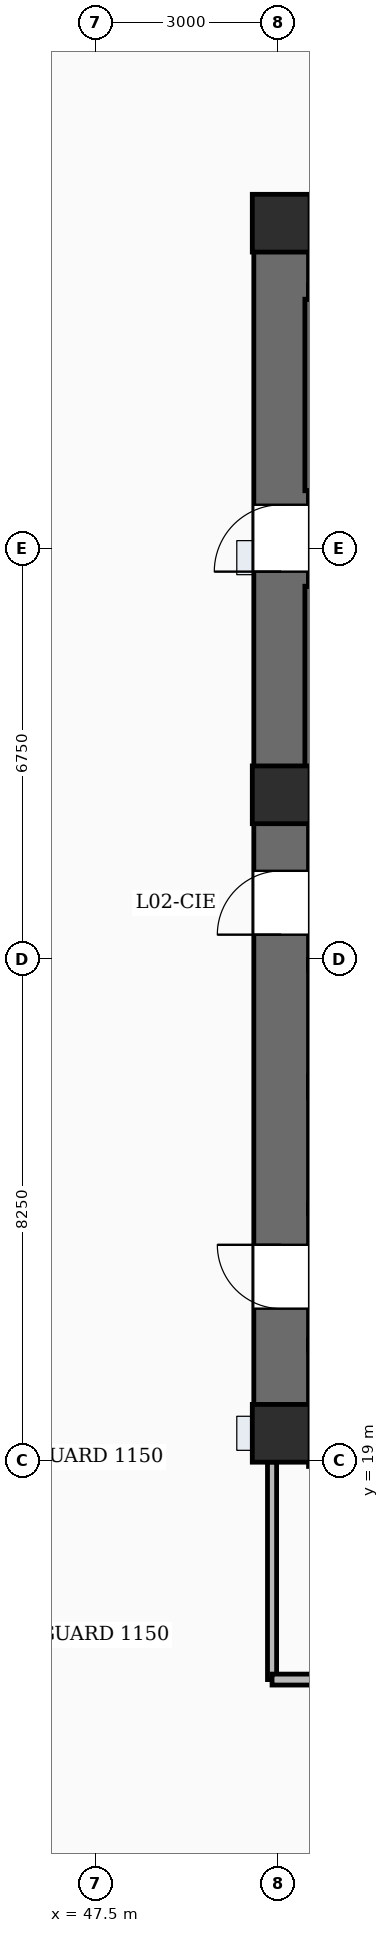
"""IFC4 building model, lengths in metres.
Left out: names, types, materials, properties, quantities, classifications, styles, units other than length and angle.
Written with IfcOpenShell. Run it as: python <this file> out.ifc"""

import sys

from ifc_helpers import new_model, si_unit, direction, frame, frame_2d, origin, origin_2d, place, context, subcontext, project, spatial, rectangle, extrude, element, fill, save


model = new_model("IFC4")
c1 = context("Model", 3, precision=1e-05, world=origin(), true_north=direction((0.0, 1.0)))
c2 = subcontext(c1, "Body", "Model", "MODEL_VIEW")
j1 = project(units=[si_unit("LENGTHUNIT", "METRE"), si_unit("PLANEANGLEUNIT", "RADIAN")], contexts=[c1])
p1 = place(None, origin())
s1 = spatial("IfcSite", under=j1, at=p1, CompositionType="ELEMENT")
p2 = place(p1, origin())
s2 = spatial("IfcBuilding", under=s1, at=p2, CompositionType="ELEMENT")
p3 = place(p2, frame((0.0, 0.0, 13.0)))
s3 = spatial("IfcBuildingStorey", under=s2, at=p3, CompositionType="ELEMENT", Elevation=13.0)
p4 = place(p3, frame((50.55, 19.0, -0.35), z_axis=(0.0, 0.0, 1.0), x_axis=(0.0, 1.0, 0.0)))
e1 = element("IfcWall", 1, at=p4, inside=s3, PredefinedType="SHEAR", context=c2, shape_type="SweptSolid", body=[
    extrude(rectangle(XDim=20.8, YDim=0.9, at=frame_2d((10.4, 0.0))), origin(), (0.0, 0.0, 1.0), 5.0),
])
p5 = place(p4, frame((2.5, 0.0, 0.35)))
e2 = element("IfcOpeningElement", 2, at=p5, cuts=e1, PredefinedType="OPENING", context=c2, shape_type="SweptSolid", body=[
    extrude(rectangle(XDim=1.05, YDim=2.15, at=frame_2d((0.525, 1.075))), frame((0.0, 0.46, 0.0), z_axis=(0.0, -1.0, 0.0), x_axis=(1.0, 0.0, 0.0)), (0.0, 0.0, 1.0), 0.92),
])
p6 = place(p4, frame((8.65, 0.0, 0.35)))
e3 = element("IfcOpeningElement", 3, at=p6, cuts=e1, PredefinedType="OPENING", context=c2, shape_type="SweptSolid", body=[
    extrude(rectangle(XDim=1.05, YDim=2.15, at=frame_2d((0.525, 1.075))), frame((0.0, 0.46, 0.0), z_axis=(0.0, -1.0, 0.0), x_axis=(1.0, 0.0, 0.0)), (0.0, 0.0, 1.0), 0.92),
])
p7 = place(p4, frame((14.62, 0.0, 0.35)))
e4 = element("IfcOpeningElement", 4, at=p7, cuts=e1, PredefinedType="OPENING", context=c2, shape_type="SweptSolid", body=[
    extrude(rectangle(XDim=1.1, YDim=2.15, at=frame_2d((0.55, 1.075))), frame((0.0, 0.46, 0.0), z_axis=(0.0, -1.0, 0.0), x_axis=(1.0, 0.0, 0.0)), (0.0, 0.0, 1.0), 0.92),
])
for number, where, z_axis, x_axis in (
    (5, (51.0, 19.45, -0.35), (0.0, 0.0, 1.0), (1.0, 0.0, 0.0)),
    (6, (51.0, 39.35, -0.35), (0.0, 0.0, 1.0), (1.0, 0.0, 0.0)),
):
    element("IfcWall", number, at=place(p3, frame(where, z_axis=z_axis, x_axis=x_axis)), inside=s3, PredefinedType="SHEAR", context=c2, shape_type="SweptSolid", body=[
        extrude(rectangle(XDim=8.9, YDim=0.9, at=frame_2d((4.45, 0.0))), origin(), (0.0, 0.0, 1.0), 5.0),
    ])
for number, where, z_axis, x_axis in (
    (7, (50.55, 19.45, -0.35), (0.0, 0.0, 1.0), (1.0, 0.0, 0.0)),
    (8, (50.55, 29.95, -0.35), (0.0, 0.0, 1.0), (1.0, 0.0, 0.0)),
    (9, (50.55, 39.35, -0.35), (0.0, 0.0, 1.0), (1.0, 0.0, 0.0)),
):
    element("IfcColumn", number, at=place(p3, frame(where, z_axis=z_axis, x_axis=x_axis)), inside=s3, PredefinedType="COLUMN", context=c2, shape_type="SweptSolid", body=[
        extrude(rectangle(XDim=0.95, YDim=0.95, at=origin_2d()), origin(), (0.0, 0.0, 1.0), 5.0),
    ])
p8 = place(p3, frame((59.9, 30.03, 0.0), z_axis=(0.0, 0.0, 1.0), x_axis=(-1.0, 0.0, 0.0)))
e10 = element("IfcWall", 10, at=p8, inside=s3, PredefinedType="SOLIDWALL", context=c2, shape_type="SweptSolid", body=[
    extrude(rectangle(XDim=8.9, YDim=0.24, at=frame_2d((4.45, 0.0))), origin(), (0.0, 0.0, 1.0), 4.65),
])
p9 = place(p8, frame((7.38, 0.0, 0.0)))
e11 = element("IfcOpeningElement", 11, at=p9, cuts=e10, PredefinedType="OPENING", context=c2, shape_type="SweptSolid", body=[
    extrude(rectangle(XDim=1.1, YDim=2.15, at=frame_2d((0.55, 1.075))), frame((0.0, 0.13, 0.0), z_axis=(0.0, -1.0, 0.0), x_axis=(1.0, 0.0, 0.0)), (0.0, 0.0, 1.0), 0.26),
])
p10 = place(p3, frame((51.0, 33.5, 0.0), z_axis=(0.0, 0.0, 1.0), x_axis=(1.0, 0.0, 0.0)))
e12 = element("IfcWall", 12, at=p10, inside=s3, PredefinedType="SOLIDWALL", context=c2, shape_type="SweptSolid", body=[
    extrude(rectangle(XDim=8.9, YDim=0.24, at=frame_2d((4.45, 0.0))), origin(), (0.0, 0.0, 1.0), 4.65),
])
p11 = place(p3, frame((51.06, 30.15, 0.0), z_axis=(0.0, 0.0, 1.0), x_axis=(0.0, 1.0, 0.0)))
e13 = element("IfcWall", 13, at=p11, inside=s3, PredefinedType="SOLIDWALL", context=c2, shape_type="SweptSolid", body=[
    extrude(rectangle(XDim=3.23, YDim=0.24, at=frame_2d((1.615, 0.0))), origin(), (0.0, 0.0, 1.0), 4.65),
])
p12 = place(p3, frame((59.9, 34.83, 0.0), z_axis=(0.0, 0.0, 1.0), x_axis=(-1.0, 0.0, 0.0)))
e14 = element("IfcWall", 14, at=p12, inside=s3, PredefinedType="SOLIDWALL", context=c2, shape_type="SweptSolid", body=[
    extrude(rectangle(XDim=8.9, YDim=0.24, at=frame_2d((4.45, 0.0))), origin(), (0.0, 0.0, 1.0), 4.65),
])
p13 = place(p12, frame((7.42, 0.0, 0.0)))
e15 = element("IfcOpeningElement", 15, at=p13, cuts=e14, PredefinedType="OPENING", context=c2, shape_type="SweptSolid", body=[
    extrude(rectangle(XDim=1.1, YDim=2.15, at=frame_2d((0.55, 1.075))), frame((0.0, 0.13, 0.0), z_axis=(0.0, -1.0, 0.0), x_axis=(1.0, 0.0, 0.0)), (0.0, 0.0, 1.0), 0.26),
])
p14 = place(p3, frame((51.0, 38.22, 0.0), z_axis=(0.0, 0.0, 1.0), x_axis=(1.0, 0.0, 0.0)))
e16 = element("IfcWall", 16, at=p14, inside=s3, PredefinedType="SOLIDWALL", context=c2, shape_type="SweptSolid", body=[
    extrude(rectangle(XDim=8.9, YDim=0.24, at=frame_2d((4.45, 0.0))), origin(), (0.0, 0.0, 1.0), 4.65),
])
p15 = place(p3, frame((51.06, 34.95, 0.0), z_axis=(0.0, 0.0, 1.0), x_axis=(0.0, 1.0, 0.0)))
e17 = element("IfcWall", 17, at=p15, inside=s3, PredefinedType="SOLIDWALL", context=c2, shape_type="SweptSolid", body=[
    extrude(rectangle(XDim=3.15, YDim=0.24, at=frame_2d((1.575, 0.0))), origin(), (0.0, 0.0, 1.0), 4.65),
])
for number, where, z_axis, x_axis in (
    (18, (51.0, 20.905, 0.0), (0.0, 0.0, 1.0), (1.0, 0.0, 0.0)),
    (19, (51.0, 18.995, 0.0), (0.0, 0.0, 1.0), (1.0, 0.0, 0.0)),
):
    element("IfcWall", number, at=place(p3, frame(where, z_axis=z_axis, x_axis=x_axis)), inside=s3, PredefinedType="SOLIDWALL", context=c2, shape_type="SweptSolid", body=[
        extrude(rectangle(XDim=2.79, YDim=0.18, at=frame_2d((1.395, 0.0))), origin(), (0.0, 0.0, 1.0), 4.65),
    ])
for number, where, z_axis, x_axis in (
    (20, (51.0, 25.055, 0.0), (0.0, 0.0, 1.0), (1.0, 0.0, 0.0)),
    (21, (51.0, 23.145, 0.0), (0.0, 0.0, 1.0), (1.0, 0.0, 0.0)),
):
    element("IfcWall", number, at=place(p3, frame(where, z_axis=z_axis, x_axis=x_axis)), inside=s3, PredefinedType="SOLIDWALL", context=c2, shape_type="SweptSolid", body=[
        extrude(rectangle(XDim=2.778, YDim=0.18, at=frame_2d((1.389, 0.0))), origin(), (0.0, 0.0, 1.0), 4.65),
    ])
p16 = place(p3, frame((51.0, 27.155, 0.0), z_axis=(0.0, 0.0, 1.0), x_axis=(1.0, 0.0, 0.0)))
e22 = element("IfcWall", 22, at=p16, inside=s3, PredefinedType="SOLIDWALL", context=c2, shape_type="SweptSolid", body=[
    extrude(rectangle(XDim=2.865, YDim=0.18, at=frame_2d((1.433, 0.0))), origin(), (0.0, 0.0, 1.0), 4.65),
])
p17 = place(p16, frame((0.785, 0.0, 0.0)))
e23 = element("IfcOpeningElement", 23, at=p17, cuts=e22, PredefinedType="OPENING", context=c2, shape_type="SweptSolid", body=[
    extrude(rectangle(XDim=1.35, YDim=2.3, at=frame_2d((0.675, 1.15))), frame((0.0, 0.1, 0.0), z_axis=(0.0, -1.0, 0.0), x_axis=(1.0, 0.0, 0.0)), (0.0, 0.0, 1.0), 0.2),
])
p18 = place(p3, frame((51.0, 25.245, 0.0), z_axis=(0.0, 0.0, 1.0), x_axis=(1.0, 0.0, 0.0)))
e24 = element("IfcWall", 24, at=p18, inside=s3, PredefinedType="SOLIDWALL", context=c2, shape_type="SweptSolid", body=[
    extrude(rectangle(XDim=2.865, YDim=0.18, at=frame_2d((1.433, 0.0))), origin(), (0.0, 0.0, 1.0), 4.65),
])
p19 = place(p3, frame((50.4, 15.4, 0.0), z_axis=(0.0, 0.0, 1.0), x_axis=(1.0, 0.0, 0.0)))
e25 = element("IfcWall", 25, at=p19, inside=s3, PredefinedType="SOLIDWALL", context=c2, shape_type="SweptSolid", body=[
    extrude(rectangle(XDim=10.0, YDim=0.18, at=frame_2d((5.0, 0.0))), origin(), (0.0, 0.0, 1.0), 3.71),
])
p20 = place(p19, frame((1.19, 0.0, 0.0)))
e26 = element("IfcOpeningElement", 26, at=p20, cuts=e25, PredefinedType="OPENING", context=c2, shape_type="SweptSolid", body=[
    extrude(rectangle(XDim=0.92, YDim=2.1, at=frame_2d((0.46, 1.05))), frame((0.0, 0.1, 0.0), z_axis=(0.0, -1.0, 0.0), x_axis=(1.0, 0.0, 0.0)), (0.0, 0.0, 1.0), 0.2),
])
p21 = place(p19, frame((4.54, 0.0, 0.0)))
e27 = element("IfcOpeningElement", 27, at=p21, cuts=e25, PredefinedType="OPENING", context=c2, shape_type="SweptSolid", body=[
    extrude(rectangle(XDim=0.92, YDim=2.1, at=frame_2d((0.46, 1.05))), frame((0.0, 0.1, 0.0), z_axis=(0.0, -1.0, 0.0), x_axis=(1.0, 0.0, 0.0)), (0.0, 0.0, 1.0), 0.2),
])
p22 = place(p19, frame((7.92, 0.0, 0.0)))
e28 = element("IfcOpeningElement", 28, at=p22, cuts=e25, PredefinedType="OPENING", context=c2, shape_type="SweptSolid", body=[
    extrude(rectangle(XDim=0.86, YDim=2.05, at=frame_2d((0.43, 1.025))), frame((0.0, 0.1, 0.0), z_axis=(0.0, -1.0, 0.0), x_axis=(1.0, 0.0, 0.0)), (0.0, 0.0, 1.0), 0.2),
])
p23 = place(p3, frame((50.4, 15.4, 0.0), z_axis=(0.0, 0.0, 1.0), x_axis=(0.0, 1.0, 0.0)))
e29 = element("IfcWall", 29, at=p23, inside=s3, PredefinedType="PARTITIONING", context=c2, shape_type="SweptSolid", body=[
    extrude(rectangle(XDim=3.58, YDim=0.15, at=frame_2d((1.79, 0.0))), origin(), (0.0, 0.0, 1.0), 3.71),
])
p24 = place(p5, origin())
e30 = element("IfcDoor", 30, at=p24, inside=s3, OperationType="SINGLE_SWING_RIGHT", PredefinedType="DOOR", context=c2, shape_type="SweptSolid", body=[
    extrude(rectangle(XDim=1.05, YDim=2.15, at=frame_2d((0.525, 1.075))), frame((0.0, 0.025, 0.0), z_axis=(0.0, -1.0, 0.0), x_axis=(1.0, 0.0, 0.0)), (0.0, 0.0, 1.0), 0.05),
])
fill(e2, e30)
p25 = place(p6, origin())
e31 = element("IfcDoor", 31, at=p25, inside=s3, OperationType="SINGLE_SWING_LEFT", PredefinedType="DOOR", context=c2, shape_type="SweptSolid", body=[
    extrude(rectangle(XDim=1.05, YDim=2.15, at=frame_2d((0.525, 1.075))), frame((0.0, 0.025, 0.0), z_axis=(0.0, -1.0, 0.0), x_axis=(1.0, 0.0, 0.0)), (0.0, 0.0, 1.0), 0.05),
])
fill(e3, e31)
p26 = place(p7, origin())
e32 = element("IfcDoor", 32, at=p26, inside=s3, OperationType="SINGLE_SWING_LEFT", PredefinedType="DOOR", context=c2, shape_type="SweptSolid", body=[
    extrude(rectangle(XDim=1.1, YDim=2.15, at=frame_2d((0.55, 1.075))), frame((0.0, 0.025, 0.0), z_axis=(0.0, -1.0, 0.0), x_axis=(1.0, 0.0, 0.0)), (0.0, 0.0, 1.0), 0.05),
])
fill(e4, e32)
save(model, sys.argv[1])
